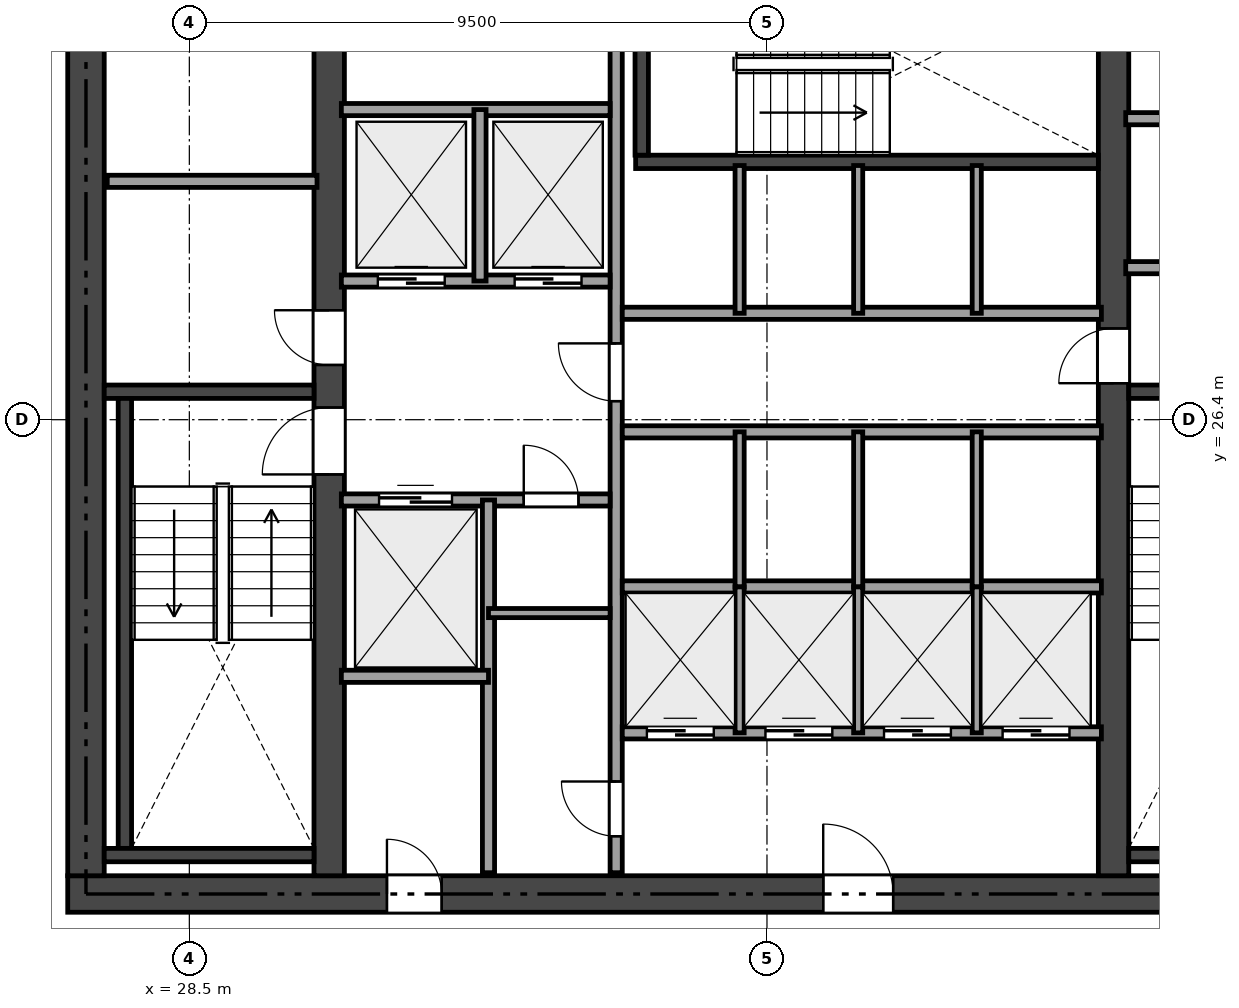
"""IFC4 building model, lengths in metres.
Left out: names, types, materials, properties, quantities, classifications, styles, units other than length and angle.
Written with IfcOpenShell. Run it as: python <this file> out.ifc"""

import sys

from ifc_helpers import new_model, si_unit, direction, frame, frame_2d, origin, place, context, subcontext, project, spatial, rectangle, extrude, element, fill, save


model = new_model("IFC4")
c1 = context("Model", 3, precision=1e-05, world=origin(), true_north=direction((0.0, 1.0)))
c2 = subcontext(c1, "Body", "Model", "MODEL_VIEW")
j1 = project(units=[si_unit("LENGTHUNIT", "METRE"), si_unit("PLANEANGLEUNIT", "RADIAN")], contexts=[c1])
p1 = place(None, origin())
s1 = spatial("IfcSite", under=j1, at=p1, CompositionType="ELEMENT")
p2 = place(p1, origin())
s2 = spatial("IfcBuilding", under=s1, at=p2, CompositionType="ELEMENT")
p3 = place(p2, frame((0.0, 0.0, 76.35)))
s3 = spatial("IfcBuildingStorey", under=s2, at=p3, CompositionType="ELEMENT", Elevation=76.35)
p4 = place(p3, frame((26.5, 18.6, 0.0), z_axis=(0.0, 0.0, 1.0), x_axis=(1.0, 0.0, 0.0)))
e1 = element("IfcWall", 1, at=p4, inside=s3, PredefinedType="SHEAR", context=c2, shape_type="SweptSolid", body=[
    extrude(rectangle(XDim=21.4, YDim=0.6, at=frame_2d((10.7, 0.0))), origin(), (0.0, 0.0, 1.0), 3.17),
])
p5 = place(p4, frame((12.425, 0.0, 0.0)))
e2 = element("IfcOpeningElement", 2, at=p5, cuts=e1, PredefinedType="OPENING", context=c2, shape_type="SweptSolid", body=[
    extrude(rectangle(XDim=1.15, YDim=2.15, at=frame_2d((0.575, 1.075))), frame((0.0, 0.31, 0.0), z_axis=(0.0, -1.0, 0.0), x_axis=(1.0, 0.0, 0.0)), (0.0, 0.0, 1.0), 0.62),
])
p6 = place(p4, frame((5.25, 0.0, 0.0)))
e3 = element("IfcOpeningElement", 3, at=p6, cuts=e1, PredefinedType="OPENING", context=c2, shape_type="SweptSolid", body=[
    extrude(rectangle(XDim=0.9, YDim=2.1, at=frame_2d((0.45, 1.05))), frame((0.0, 0.31, 0.0), z_axis=(0.0, -1.0, 0.0), x_axis=(1.0, 0.0, 0.0)), (0.0, 0.0, 1.0), 0.62),
])
p7 = place(p3, frame((26.8, 18.9, 0.0), z_axis=(0.0, 0.0, 1.0), x_axis=(0.0, 1.0, 0.0)))
e4 = element("IfcWall", 4, at=p7, inside=s3, PredefinedType="SHEAR", context=c2, shape_type="SweptSolid", body=[
    extrude(rectangle(XDim=15.0, YDim=0.6, at=frame_2d((7.5, 0.0))), origin(), (0.0, 0.0, 1.0), 3.17),
])
p8 = place(p3, frame((30.8, 18.9, 0.0), z_axis=(0.0, 0.0, 1.0), x_axis=(0.0, 1.0, 0.0)))
e5 = element("IfcWall", 5, at=p8, inside=s3, PredefinedType="SHEAR", context=c2, shape_type="SweptSolid", body=[
    extrude(rectangle(XDim=15.0, YDim=0.5, at=frame_2d((7.5, 0.0))), origin(), (0.0, 0.0, 1.0), 3.17),
])
p9 = place(p8, frame((6.6, 0.0, 0.0)))
e6 = element("IfcOpeningElement", 6, at=p9, cuts=e5, PredefinedType="OPENING", context=c2, shape_type="SweptSolid", body=[
    extrude(rectangle(XDim=1.1, YDim=2.15, at=frame_2d((0.55, 1.075))), frame((0.0, 0.26, 0.0), z_axis=(0.0, -1.0, 0.0), x_axis=(1.0, 0.0, 0.0)), (0.0, 0.0, 1.0), 0.52),
])
p10 = place(p8, frame((8.4, 0.0, 0.0)))
e7 = element("IfcOpeningElement", 7, at=p10, cuts=e5, PredefinedType="OPENING", context=c2, shape_type="SweptSolid", body=[
    extrude(rectangle(XDim=0.9, YDim=2.1, at=frame_2d((0.45, 1.05))), frame((0.0, 0.26, 0.0), z_axis=(0.0, -1.0, 0.0), x_axis=(1.0, 0.0, 0.0)), (0.0, 0.0, 1.0), 0.52),
])
p11 = place(p3, frame((43.7, 18.9, 0.0), z_axis=(0.0, 0.0, 1.0), x_axis=(0.0, 1.0, 0.0)))
e8 = element("IfcWall", 8, at=p11, inside=s3, PredefinedType="SHEAR", context=c2, shape_type="SweptSolid", body=[
    extrude(rectangle(XDim=15.0, YDim=0.5, at=frame_2d((7.5, 0.0))), origin(), (0.0, 0.0, 1.0), 3.17),
])
p12 = place(p11, frame((8.1, 0.0, 0.0)))
e9 = element("IfcOpeningElement", 9, at=p12, cuts=e8, PredefinedType="OPENING", context=c2, shape_type="SweptSolid", body=[
    extrude(rectangle(XDim=0.9, YDim=2.1, at=frame_2d((0.45, 1.05))), frame((0.0, 0.26, 0.0), z_axis=(0.0, -1.0, 0.0), x_axis=(1.0, 0.0, 0.0)), (0.0, 0.0, 1.0), 0.52),
])
p13 = place(p3, frame((27.1, 26.86, 0.0), z_axis=(0.0, 0.0, 1.0), x_axis=(1.0, 0.0, 0.0)))
e10 = element("IfcWall", 10, at=p13, inside=s3, PredefinedType="SHEAR", context=c2, shape_type="SweptSolid", body=[
    extrude(rectangle(XDim=3.45, YDim=0.22, at=frame_2d((1.725, 0.0))), origin(), (0.0, 0.0, 1.0), 3.17),
])
p14 = place(p3, frame((27.44, 19.35, 0.0), z_axis=(0.0, 0.0, 1.0), x_axis=(0.0, 1.0, 0.0)))
e11 = element("IfcWall", 11, at=p14, inside=s3, PredefinedType="SHEAR", context=c2, shape_type="SweptSolid", body=[
    extrude(rectangle(XDim=7.4, YDim=0.22, at=frame_2d((3.7, 0.0))), origin(), (0.0, 0.0, 1.0), 3.17),
])
p15 = place(p3, frame((27.1, 19.24, 0.0), z_axis=(0.0, 0.0, 1.0), x_axis=(1.0, 0.0, 0.0)))
e12 = element("IfcWall", 12, at=p15, inside=s3, PredefinedType="SHEAR", context=c2, shape_type="SweptSolid", body=[
    extrude(rectangle(XDim=3.45, YDim=0.22, at=frame_2d((1.725, 0.0))), origin(), (0.0, 0.0, 1.0), 3.17),
])
for number, where, z_axis, x_axis in (
    (13, (43.95, 26.86, 0.0), (0.0, 0.0, 1.0), (1.0, 0.0, 0.0)),
    (14, (43.95, 19.24, 0.0), (0.0, 0.0, 1.0), (1.0, 0.0, 0.0)),
):
    element("IfcWall", number, at=place(p3, frame(where, z_axis=z_axis, x_axis=x_axis)), inside=s3, PredefinedType="SHEAR", context=c2, shape_type="SweptSolid", body=[
        extrude(rectangle(XDim=3.35, YDim=0.22, at=frame_2d((1.675, 0.0))), origin(), (0.0, 0.0, 1.0), 3.17),
    ])
p16 = place(p3, frame((35.84, 30.64, 0.0), z_axis=(0.0, 0.0, 1.0), x_axis=(1.0, 0.0, 0.0)))
e15 = element("IfcWall", 15, at=p16, inside=s3, PredefinedType="SHEAR", context=c2, shape_type="SweptSolid", body=[
    extrude(rectangle(XDim=7.61, YDim=0.22, at=frame_2d((3.805, 0.0))), origin(), (0.0, 0.0, 1.0), 3.17),
])
p17 = place(p3, frame((35.94, 30.75, 0.0), z_axis=(0.0, 0.0, 1.0), x_axis=(0.0, 1.0, 0.0)))
e16 = element("IfcWall", 16, at=p17, inside=s3, PredefinedType="SHEAR", context=c2, shape_type="SweptSolid", body=[
    extrude(rectangle(XDim=3.15, YDim=0.22, at=frame_2d((1.575, 0.0))), origin(), (0.0, 0.0, 1.0), 3.17),
])
p18 = place(p3, frame((27.15, 30.32, 0.0), z_axis=(0.0, 0.0, 1.0), x_axis=(1.0, 0.0, 0.0)))
e17 = element("IfcWall", 17, at=p18, inside=s3, PredefinedType="SOLIDWALL", context=c2, shape_type="SweptSolid", body=[
    extrude(rectangle(XDim=3.45, YDim=0.2, at=frame_2d((1.725, 0.0))), origin(), (0.0, 0.0, 1.0), 3.17),
])
p19 = place(p3, frame((43.9, 28.9, 0.0), z_axis=(0.0, 0.0, 1.0), x_axis=(1.0, 0.0, 0.0)))
e18 = element("IfcWall", 18, at=p19, inside=s3, PredefinedType="SOLIDWALL", context=c2, shape_type="SweptSolid", body=[
    extrude(rectangle(XDim=3.35, YDim=0.2, at=frame_2d((1.675, 0.0))), origin(), (0.0, 0.0, 1.0), 3.17),
])
p20 = place(p19, frame((1.15, 0.0, 0.0)))
e19 = element("IfcOpeningElement", 19, at=p20, cuts=e18, PredefinedType="OPENING", context=c2, shape_type="SweptSolid", body=[
    extrude(rectangle(XDim=0.9, YDim=2.1, at=frame_2d((0.45, 1.05))), frame((0.0, 0.11, 0.0), z_axis=(0.0, -1.0, 0.0), x_axis=(1.0, 0.0, 0.0)), (0.0, 0.0, 1.0), 0.22),
])
p21 = place(p3, frame((43.9, 31.35, 0.0), z_axis=(0.0, 0.0, 1.0), x_axis=(1.0, 0.0, 0.0)))
e20 = element("IfcWall", 20, at=p21, inside=s3, PredefinedType="SOLIDWALL", context=c2, shape_type="SweptSolid", body=[
    extrude(rectangle(XDim=3.35, YDim=0.2, at=frame_2d((1.675, 0.0))), origin(), (0.0, 0.0, 1.0), 3.17),
])
p22 = place(p3, frame((35.52, 18.95, 0.0), z_axis=(0.0, 0.0, 1.0), x_axis=(0.0, 1.0, 0.0)))
e21 = element("IfcWall", 21, at=p22, inside=s3, PredefinedType="SOLIDWALL", context=c2, shape_type="SweptSolid", body=[
    extrude(rectangle(XDim=14.9, YDim=0.2, at=frame_2d((7.45, 0.0))), origin(), (0.0, 0.0, 1.0), 2.691),
])
p23 = place(p22, frame((7.755, 0.0, 0.0)))
e22 = element("IfcOpeningElement", 22, at=p23, cuts=e21, PredefinedType="OPENING", context=c2, shape_type="SweptSolid", body=[
    extrude(rectangle(XDim=0.95, YDim=2.15, at=frame_2d((0.475, 1.075))), frame((0.0, 0.11, 0.0), z_axis=(0.0, -1.0, 0.0), x_axis=(1.0, 0.0, 0.0)), (0.0, 0.0, 1.0), 0.22),
])
p24 = place(p22, frame((0.6, 0.0, 0.0)))
e23 = element("IfcOpeningElement", 23, at=p24, cuts=e21, PredefinedType="OPENING", context=c2, shape_type="SweptSolid", body=[
    extrude(rectangle(XDim=0.9, YDim=2.1, at=frame_2d((0.45, 1.05))), frame((0.0, 0.11, 0.0), z_axis=(0.0, -1.0, 0.0), x_axis=(1.0, 0.0, 0.0)), (0.0, 0.0, 1.0), 0.22),
])
p25 = place(p3, frame((31.0, 28.68, 0.0), z_axis=(0.0, 0.0, 1.0), x_axis=(1.0, 0.0, 0.0)))
e24 = element("IfcWall", 24, at=p25, inside=s3, PredefinedType="SOLIDWALL", context=c2, shape_type="SweptSolid", body=[
    extrude(rectangle(XDim=4.42, YDim=0.2, at=frame_2d((2.21, 0.0))), origin(), (0.0, 0.0, 1.0), 3.17),
])
p26 = place(p25, frame((0.6, 0.0, 0.0)))
e25 = element("IfcOpeningElement", 25, at=p26, cuts=e24, PredefinedType="OPENING", context=c2, shape_type="SweptSolid", body=[
    extrude(rectangle(XDim=1.1, YDim=2.15, at=frame_2d((0.55, 1.075))), frame((0.0, 0.11, 0.0), z_axis=(0.0, -1.0, 0.0), x_axis=(1.0, 0.0, 0.0)), (0.0, 0.0, 1.0), 0.22),
])
p27 = place(p25, frame((2.85, 0.0, 0.0)))
e26 = element("IfcOpeningElement", 26, at=p27, cuts=e24, PredefinedType="OPENING", context=c2, shape_type="SweptSolid", body=[
    extrude(rectangle(XDim=1.1, YDim=2.15, at=frame_2d((0.55, 1.075))), frame((0.0, 0.11, 0.0), z_axis=(0.0, -1.0, 0.0), x_axis=(1.0, 0.0, 0.0)), (0.0, 0.0, 1.0), 0.22),
])
p28 = place(p3, frame((31.0, 31.5, 0.0), z_axis=(0.0, 0.0, 1.0), x_axis=(1.0, 0.0, 0.0)))
e27 = element("IfcWall", 27, at=p28, inside=s3, PredefinedType="SOLIDWALL", context=c2, shape_type="SweptSolid", body=[
    extrude(rectangle(XDim=4.42, YDim=0.2, at=frame_2d((2.21, 0.0))), origin(), (0.0, 0.0, 1.0), 3.17),
])
p29 = place(p3, frame((33.28, 28.68, 0.0), z_axis=(0.0, 0.0, 1.0), x_axis=(0.0, 1.0, 0.0)))
e28 = element("IfcWall", 28, at=p29, inside=s3, PredefinedType="SOLIDWALL", context=c2, shape_type="SweptSolid", body=[
    extrude(rectangle(XDim=2.82, YDim=0.2, at=frame_2d((1.41, 0.0))), origin(), (0.0, 0.0, 1.0), 3.17),
])
p30 = place(p3, frame((31.0, 25.08, 0.0), z_axis=(0.0, 0.0, 1.0), x_axis=(1.0, 0.0, 0.0)))
e29 = element("IfcWall", 29, at=p30, inside=s3, PredefinedType="SOLIDWALL", context=c2, shape_type="SweptSolid", body=[
    extrude(rectangle(XDim=4.42, YDim=0.2, at=frame_2d((2.21, 0.0))), origin(), (0.0, 0.0, 1.0), 3.17),
])
p31 = place(p30, frame((3.0, 0.0, 0.0)))
e30 = element("IfcOpeningElement", 30, at=p31, cuts=e29, PredefinedType="OPENING", context=c2, shape_type="SweptSolid", body=[
    extrude(rectangle(XDim=0.9, YDim=2.1, at=frame_2d((0.45, 1.05))), frame((0.0, 0.11, 0.0), z_axis=(0.0, -1.0, 0.0), x_axis=(1.0, 0.0, 0.0)), (0.0, 0.0, 1.0), 0.22),
])
p32 = place(p30, frame((0.62, 0.0, 0.0)))
e31 = element("IfcOpeningElement", 31, at=p32, cuts=e29, PredefinedType="OPENING", context=c2, shape_type="SweptSolid", body=[
    extrude(rectangle(XDim=1.2, YDim=2.15, at=frame_2d((0.6, 1.075))), frame((0.0, 0.11, 0.0), z_axis=(0.0, -1.0, 0.0), x_axis=(1.0, 0.0, 0.0)), (0.0, 0.0, 1.0), 0.22),
])
p33 = place(p3, frame((33.42, 18.95, 0.0), z_axis=(0.0, 0.0, 1.0), x_axis=(0.0, 1.0, 0.0)))
e32 = element("IfcWall", 32, at=p33, inside=s3, PredefinedType="SOLIDWALL", context=c2, shape_type="SweptSolid", body=[
    extrude(rectangle(XDim=6.13, YDim=0.2, at=frame_2d((3.065, 0.0))), origin(), (0.0, 0.0, 1.0), 2.691),
])
p34 = place(p3, frame((31.0, 22.18, 0.0), z_axis=(0.0, 0.0, 1.0), x_axis=(1.0, 0.0, 0.0)))
e33 = element("IfcWall", 33, at=p34, inside=s3, PredefinedType="SOLIDWALL", context=c2, shape_type="SweptSolid", body=[
    extrude(rectangle(XDim=2.42, YDim=0.2, at=frame_2d((1.21, 0.0))), origin(), (0.0, 0.0, 1.0), 3.17),
])
p35 = place(p3, frame((33.42, 23.22, 0.0), z_axis=(0.0, 0.0, 1.0), x_axis=(1.0, 0.0, 0.0)))
e34 = element("IfcWall", 34, at=p35, inside=s3, PredefinedType="PARTITIONING", context=c2, shape_type="SweptSolid", body=[
    extrude(rectangle(XDim=2.0, YDim=0.15, at=frame_2d((1.0, 0.0))), origin(), (0.0, 0.0, 1.0), 3.17),
])
for number, where, z_axis, x_axis in (
    (35, (35.62, 28.15, 0.0), (0.0, 0.0, 1.0), (1.0, 0.0, 0.0)),
    (36, (35.62, 26.2, 0.0), (0.0, 0.0, 1.0), (1.0, 0.0, 0.0)),
):
    element("IfcWall", number, at=place(p3, frame(where, z_axis=z_axis, x_axis=x_axis)), inside=s3, PredefinedType="SOLIDWALL", context=c2, shape_type="SweptSolid", body=[
        extrude(rectangle(XDim=7.88, YDim=0.2, at=frame_2d((3.94, 0.0))), origin(), (0.0, 0.0, 1.0), 3.17),
    ])
p36 = place(p3, frame((35.62, 23.65, 0.0), z_axis=(0.0, 0.0, 1.0), x_axis=(1.0, 0.0, 0.0)))
e37 = element("IfcWall", 37, at=p36, inside=s3, PredefinedType="SOLIDWALL", context=c2, shape_type="SweptSolid", body=[
    extrude(rectangle(XDim=7.88, YDim=0.2, at=frame_2d((3.94, 0.0))), origin(), (0.0, 0.0, 1.0), 2.691),
])
p37 = place(p3, frame((35.62, 21.25, 0.0), z_axis=(0.0, 0.0, 1.0), x_axis=(1.0, 0.0, 0.0)))
e38 = element("IfcWall", 38, at=p37, inside=s3, PredefinedType="SOLIDWALL", context=c2, shape_type="SweptSolid", body=[
    extrude(rectangle(XDim=7.88, YDim=0.2, at=frame_2d((3.94, 0.0))), origin(), (0.0, 0.0, 1.0), 3.17),
])
p38 = place(p37, frame((0.405, 0.0, 0.0)))
e39 = element("IfcOpeningElement", 39, at=p38, cuts=e38, PredefinedType="OPENING", context=c2, shape_type="SweptSolid", body=[
    extrude(rectangle(XDim=1.1, YDim=2.15, at=frame_2d((0.55, 1.075))), frame((0.0, 0.11, 0.0), z_axis=(0.0, -1.0, 0.0), x_axis=(1.0, 0.0, 0.0)), (0.0, 0.0, 1.0), 0.22),
])
p39 = place(p37, frame((2.355, 0.0, 0.0)))
e40 = element("IfcOpeningElement", 40, at=p39, cuts=e38, PredefinedType="OPENING", context=c2, shape_type="SweptSolid", body=[
    extrude(rectangle(XDim=1.1, YDim=2.15, at=frame_2d((0.55, 1.075))), frame((0.0, 0.11, 0.0), z_axis=(0.0, -1.0, 0.0), x_axis=(1.0, 0.0, 0.0)), (0.0, 0.0, 1.0), 0.22),
])
p40 = place(p37, frame((4.305, 0.0, 0.0)))
e41 = element("IfcOpeningElement", 41, at=p40, cuts=e38, PredefinedType="OPENING", context=c2, shape_type="SweptSolid", body=[
    extrude(rectangle(XDim=1.1, YDim=2.15, at=frame_2d((0.55, 1.075))), frame((0.0, 0.11, 0.0), z_axis=(0.0, -1.0, 0.0), x_axis=(1.0, 0.0, 0.0)), (0.0, 0.0, 1.0), 0.22),
])
p41 = place(p37, frame((6.255, 0.0, 0.0)))
e42 = element("IfcOpeningElement", 42, at=p41, cuts=e38, PredefinedType="OPENING", context=c2, shape_type="SweptSolid", body=[
    extrude(rectangle(XDim=1.1, YDim=2.15, at=frame_2d((0.55, 1.075))), frame((0.0, 0.11, 0.0), z_axis=(0.0, -1.0, 0.0), x_axis=(1.0, 0.0, 0.0)), (0.0, 0.0, 1.0), 0.22),
])
for number, where, z_axis, x_axis in (
    (43, (37.55, 28.15, 0.0), (0.0, 0.0, 1.0), (0.0, 1.0, 0.0)),
    (44, (39.5, 28.15, 0.0), (0.0, 0.0, 1.0), (0.0, 1.0, 0.0)),
    (45, (41.45, 28.15, 0.0), (0.0, 0.0, 1.0), (0.0, 1.0, 0.0)),
):
    element("IfcWall", number, at=place(p3, frame(where, z_axis=z_axis, x_axis=x_axis)), inside=s3, PredefinedType="PARTITIONING", context=c2, shape_type="SweptSolid", body=[
        extrude(rectangle(XDim=2.43, YDim=0.15, at=frame_2d((1.215, 0.0))), origin(), (0.0, 0.0, 1.0), 3.17),
    ])
for number, where, z_axis, x_axis in (
    (46, (37.55, 23.65, 0.0), (0.0, 0.0, 1.0), (0.0, 1.0, 0.0)),
    (47, (39.5, 23.65, 0.0), (0.0, 0.0, 1.0), (0.0, 1.0, 0.0)),
    (48, (41.45, 23.65, 0.0), (0.0, 0.0, 1.0), (0.0, 1.0, 0.0)),
):
    element("IfcWall", number, at=place(p3, frame(where, z_axis=z_axis, x_axis=x_axis)), inside=s3, PredefinedType="PARTITIONING", context=c2, shape_type="SweptSolid", body=[
        extrude(rectangle(XDim=2.55, YDim=0.15, at=frame_2d((1.275, 0.0))), origin(), (0.0, 0.0, 1.0), 2.691),
    ])
for number, where, z_axis, x_axis in (
    (49, (37.55, 21.25, 0.0), (0.0, 0.0, 1.0), (0.0, 1.0, 0.0)),
    (50, (39.5, 21.25, 0.0), (0.0, 0.0, 1.0), (0.0, 1.0, 0.0)),
    (51, (41.45, 21.25, 0.0), (0.0, 0.0, 1.0), (0.0, 1.0, 0.0)),
):
    element("IfcWall", number, at=place(p3, frame(where, z_axis=z_axis, x_axis=x_axis)), inside=s3, PredefinedType="PARTITIONING", context=c2, shape_type="SweptSolid", body=[
        extrude(rectangle(XDim=2.4, YDim=0.15, at=frame_2d((1.2, 0.0))), origin(), (0.0, 0.0, 1.0), 2.691),
    ])
p42 = place(p9, origin())
e52 = element("IfcDoor", 52, at=p42, inside=s3, OperationType="SINGLE_SWING_LEFT", PredefinedType="DOOR", context=c2, shape_type="SweptSolid", body=[
    extrude(rectangle(XDim=1.1, YDim=2.15, at=frame_2d((0.55, 1.075))), frame((0.0, 0.025, 0.0), z_axis=(0.0, -1.0, 0.0), x_axis=(1.0, 0.0, 0.0)), (0.0, 0.0, 1.0), 0.05),
])
fill(e6, e52)
p43 = place(p23, origin())
e53 = element("IfcDoor", 53, at=p43, inside=s3, OperationType="SINGLE_SWING_RIGHT", PredefinedType="DOOR", context=c2, shape_type="SweptSolid", body=[
    extrude(rectangle(XDim=0.95, YDim=2.15, at=frame_2d((0.475, 1.075))), frame((0.0, 0.025, 0.0), z_axis=(0.0, -1.0, 0.0), x_axis=(1.0, 0.0, 0.0)), (0.0, 0.0, 1.0), 0.05),
])
fill(e22, e53)
p44 = place(p12, origin())
e54 = element("IfcDoor", 54, at=p44, inside=s3, OperationType="SINGLE_SWING_LEFT", PredefinedType="DOOR", context=c2, shape_type="SweptSolid", body=[
    extrude(rectangle(XDim=0.9, YDim=2.1, at=frame_2d((0.45, 1.05))), frame((0.0, 0.025, 0.0), z_axis=(0.0, -1.0, 0.0), x_axis=(1.0, 0.0, 0.0)), (0.0, 0.0, 1.0), 0.05),
])
fill(e9, e54)
p45 = place(p5, origin())
e55 = element("IfcDoor", 55, at=p45, inside=s3, OperationType="SINGLE_SWING_LEFT", PredefinedType="DOOR", context=c2, shape_type="SweptSolid", body=[
    extrude(rectangle(XDim=1.15, YDim=2.15, at=frame_2d((0.575, 1.075))), frame((0.0, 0.025, 0.0), z_axis=(0.0, -1.0, 0.0), x_axis=(1.0, 0.0, 0.0)), (0.0, 0.0, 1.0), 0.05),
])
fill(e2, e55)
p46 = place(p10, origin())
e56 = element("IfcDoor", 56, at=p46, inside=s3, OperationType="SINGLE_SWING_RIGHT", PredefinedType="DOOR", context=c2, shape_type="SweptSolid", body=[
    extrude(rectangle(XDim=0.9, YDim=2.1, at=frame_2d((0.45, 1.05))), frame((0.0, 0.025, 0.0), z_axis=(0.0, -1.0, 0.0), x_axis=(1.0, 0.0, 0.0)), (0.0, 0.0, 1.0), 0.05),
])
fill(e7, e56)
p47 = place(p6, origin())
e57 = element("IfcDoor", 57, at=p47, inside=s3, OperationType="SINGLE_SWING_LEFT", PredefinedType="DOOR", context=c2, shape_type="SweptSolid", body=[
    extrude(rectangle(XDim=0.9, YDim=2.1, at=frame_2d((0.45, 1.05))), frame((0.0, 0.025, 0.0), z_axis=(0.0, -1.0, 0.0), x_axis=(1.0, 0.0, 0.0)), (0.0, 0.0, 1.0), 0.05),
])
fill(e3, e57)
p48 = place(p24, origin())
e58 = element("IfcDoor", 58, at=p48, inside=s3, OperationType="SINGLE_SWING_RIGHT", PredefinedType="DOOR", context=c2, shape_type="SweptSolid", body=[
    extrude(rectangle(XDim=0.9, YDim=2.1, at=frame_2d((0.45, 1.05))), frame((0.0, 0.025, 0.0), z_axis=(0.0, -1.0, 0.0), x_axis=(1.0, 0.0, 0.0)), (0.0, 0.0, 1.0), 0.05),
])
fill(e23, e58)
p49 = place(p31, origin())
e59 = element("IfcDoor", 59, at=p49, inside=s3, OperationType="SINGLE_SWING_LEFT", PredefinedType="DOOR", context=c2, shape_type="SweptSolid", body=[
    extrude(rectangle(XDim=0.9, YDim=2.1, at=frame_2d((0.45, 1.05))), frame((0.0, 0.025, 0.0), z_axis=(0.0, -1.0, 0.0), x_axis=(1.0, 0.0, 0.0)), (0.0, 0.0, 1.0), 0.05),
])
fill(e30, e59)
p50 = place(p26, origin())
e60 = element("IfcDoor", 60, at=p50, inside=s3, OperationType="SLIDING_TO_LEFT", PredefinedType="DOOR", context=c2, shape_type="SweptSolid", body=[
    extrude(rectangle(XDim=1.1, YDim=2.15, at=frame_2d((0.55, 1.075))), frame((0.0, 0.025, 0.0), z_axis=(0.0, -1.0, 0.0), x_axis=(1.0, 0.0, 0.0)), (0.0, 0.0, 1.0), 0.05),
])
fill(e25, e60)
p51 = place(p27, origin())
e61 = element("IfcDoor", 61, at=p51, inside=s3, OperationType="SLIDING_TO_LEFT", PredefinedType="DOOR", context=c2, shape_type="SweptSolid", body=[
    extrude(rectangle(XDim=1.1, YDim=2.15, at=frame_2d((0.55, 1.075))), frame((0.0, 0.025, 0.0), z_axis=(0.0, -1.0, 0.0), x_axis=(1.0, 0.0, 0.0)), (0.0, 0.0, 1.0), 0.05),
])
fill(e26, e61)
p52 = place(p32, origin())
e62 = element("IfcDoor", 62, at=p52, inside=s3, OperationType="SLIDING_TO_LEFT", PredefinedType="DOOR", context=c2, shape_type="SweptSolid", body=[
    extrude(rectangle(XDim=1.2, YDim=2.15, at=frame_2d((0.6, 1.075))), frame((0.0, 0.025, 0.0), z_axis=(0.0, -1.0, 0.0), x_axis=(1.0, 0.0, 0.0)), (0.0, 0.0, 1.0), 0.05),
])
fill(e31, e62)
p53 = place(p38, origin())
e63 = element("IfcDoor", 63, at=p53, inside=s3, OperationType="SLIDING_TO_LEFT", PredefinedType="DOOR", context=c2, shape_type="SweptSolid", body=[
    extrude(rectangle(XDim=1.1, YDim=2.15, at=frame_2d((0.55, 1.075))), frame((0.0, 0.025, 0.0), z_axis=(0.0, -1.0, 0.0), x_axis=(1.0, 0.0, 0.0)), (0.0, 0.0, 1.0), 0.05),
])
fill(e39, e63)
p54 = place(p39, origin())
e64 = element("IfcDoor", 64, at=p54, inside=s3, OperationType="SLIDING_TO_LEFT", PredefinedType="DOOR", context=c2, shape_type="SweptSolid", body=[
    extrude(rectangle(XDim=1.1, YDim=2.15, at=frame_2d((0.55, 1.075))), frame((0.0, 0.025, 0.0), z_axis=(0.0, -1.0, 0.0), x_axis=(1.0, 0.0, 0.0)), (0.0, 0.0, 1.0), 0.05),
])
fill(e40, e64)
p55 = place(p40, origin())
e65 = element("IfcDoor", 65, at=p55, inside=s3, OperationType="SLIDING_TO_LEFT", PredefinedType="DOOR", context=c2, shape_type="SweptSolid", body=[
    extrude(rectangle(XDim=1.1, YDim=2.15, at=frame_2d((0.55, 1.075))), frame((0.0, 0.025, 0.0), z_axis=(0.0, -1.0, 0.0), x_axis=(1.0, 0.0, 0.0)), (0.0, 0.0, 1.0), 0.05),
])
fill(e41, e65)
p56 = place(p41, origin())
e66 = element("IfcDoor", 66, at=p56, inside=s3, OperationType="SLIDING_TO_LEFT", PredefinedType="DOOR", context=c2, shape_type="SweptSolid", body=[
    extrude(rectangle(XDim=1.1, YDim=2.15, at=frame_2d((0.55, 1.075))), frame((0.0, 0.025, 0.0), z_axis=(0.0, -1.0, 0.0), x_axis=(1.0, 0.0, 0.0)), (0.0, 0.0, 1.0), 0.05),
])
fill(e42, e66)
save(model, sys.argv[1])
